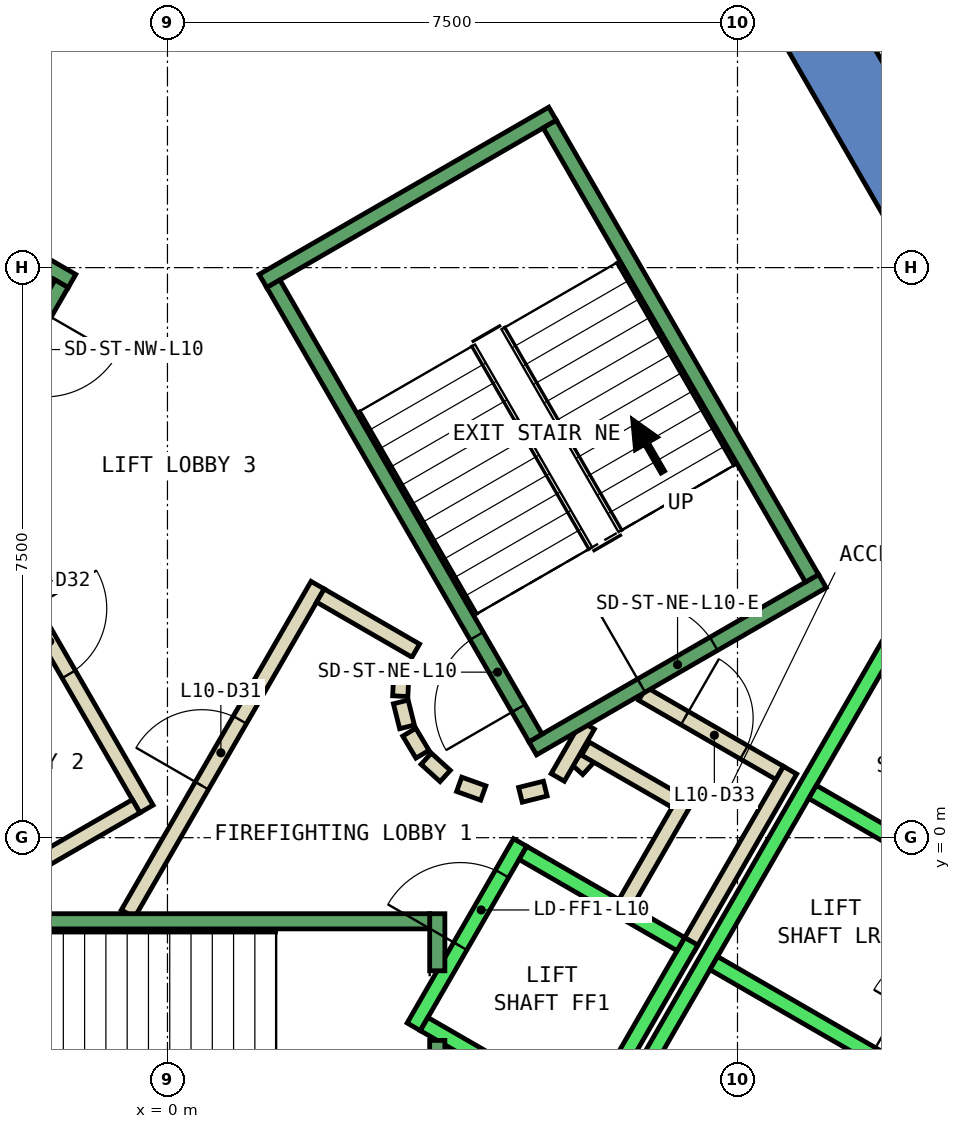
"""IFC4 building model, lengths in metres.
Left out: names, types, materials, properties, quantities, classifications, styles, units other than length and angle.
Written with IfcOpenShell. Run it as: python <this file> out.ifc"""

import sys

from ifc_helpers import new_model, si_unit, direction, frame, frame_2d, origin, place, context, subcontext, project, spatial, polyline, rectangle, outline, extrude, element, fill, save


model = new_model("IFC4")
c1 = context("Model", 3, precision=1e-05, world=origin(), true_north=direction((0.0, 1.0)))
c2 = subcontext(c1, "Body", "Model", "MODEL_VIEW")
j1 = project(units=[si_unit("LENGTHUNIT", "METRE"), si_unit("PLANEANGLEUNIT", "RADIAN")], contexts=[c1])
p1 = place(None, origin())
s1 = spatial("IfcSite", under=j1, at=p1, CompositionType="ELEMENT")
p2 = place(p1, origin())
s2 = spatial("IfcBuilding", under=s1, at=p2, CompositionType="ELEMENT")
p3 = place(p2, frame((0.0, 0.0, 51.8)))
s3 = spatial("IfcBuildingStorey", under=s2, at=p3, CompositionType="ELEMENT", Elevation=51.8)
p4 = place(p3, frame((0.0, 0.0, -0.4)))
e1 = element("IfcWall", 1, at=p4, inside=s3, PredefinedType="SHEAR", context=c2, shape_type="SweptSolid", body=[
    extrude(outline(polyline([(8.517, 11.748), (7.651, 11.248), (12.702, 2.5), (13.856, 2.5), (8.517, 11.748)])), origin(), (0.0, 0.0, 1.0), 4.2),
])
p5 = place(p3, frame((0.0, 0.0, -0.4)))
e2 = element("IfcWall", 2, at=p5, inside=s3, PredefinedType="SHEAR", context=c2, shape_type="SweptSolid", body=[
    extrude(outline(polyline([(10.717, -2.937), (9.851, -2.437), (9.201, -3.563), (10.067, -4.063), (10.717, -2.937)])), origin(), (0.0, 0.0, 1.0), 4.2),
])
p6 = place(p3, frame((5.39, 0.898, 0.0), z_axis=(0.0, 0.0, 1.0), x_axis=(0.673828488714, 0.738887791073, 0.0)))
e3 = element("IfcWall", 3, at=p6, inside=s3, PredefinedType="PARTITIONING", context=c2, shape_type="SweptSolid", body=[
    extrude(rectangle(XDim=0.263, YDim=0.2, at=frame_2d((0.131, 0.0))), origin(), (0.0, 0.0, 1.0), 3.8),
])
p7 = place(p3, frame((5.499, 1.172, 0.0), z_axis=(0.0, 0.0, 1.0), x_axis=(0.866333505267, -0.499465972466, 0.0)))
e4 = element("IfcWall", 4, at=p7, inside=s3, PredefinedType="PARTITIONING", context=c2, shape_type="SweptSolid", body=[
    extrude(rectangle(XDim=1.374, YDim=0.2, at=frame_2d((0.687, 0.0))), origin(), (0.0, 0.0, 1.0), 3.8),
])
p8 = place(p3, frame((6.826, 0.522, 0.0), z_axis=(0.0, 0.0, 1.0), x_axis=(-0.500016722714, -0.866015748706, 0.0)))
e5 = element("IfcWall", 5, at=p8, inside=s3, PredefinedType="PARTITIONING", context=c2, shape_type="SweptSolid", body=[
    extrude(rectangle(XDim=1.7, YDim=0.2, at=frame_2d((0.85, 0.0))), origin(), (0.0, 0.0, 1.0), 3.8),
])
p9 = place(p3, frame((6.25, 1.894, 0.0), z_axis=(0.0, 0.0, 1.0), x_axis=(0.866043184279, -0.499969202016, 0.0)))
e6 = element("IfcWall", 6, at=p9, inside=s3, PredefinedType="PARTITIONING", context=c2, shape_type="SweptSolid", body=[
    extrude(rectangle(XDim=2.084, YDim=0.2, at=frame_2d((1.042, 0.0))), origin(), (0.0, 0.0, 1.0), 3.8),
])
p10 = place(p9, frame((0.642, 0.0, 0.0)))
e7 = element("IfcOpeningElement", 7, at=p10, cuts=e6, PredefinedType="OPENING", context=c2, shape_type="SweptSolid", body=[
    extrude(rectangle(XDim=0.9, YDim=2.1, at=frame_2d((0.45, 1.05))), frame((0.0, 0.11, 0.0), z_axis=(0.0, -1.0, 0.0), x_axis=(1.0, 0.0, 0.0)), (0.0, 0.0, 1.0), 0.22),
])
p11 = place(p3, frame((8.192, 0.888, 0.0), z_axis=(0.0, 0.0, 1.0), x_axis=(-0.499940625693, -0.866059680843, 0.0)))
e8 = element("IfcWall", 8, at=p11, inside=s3, PredefinedType="PARTITIONING", context=c2, shape_type="SweptSolid", body=[
    extrude(rectangle(XDim=2.68, YDim=0.2, at=frame_2d((1.34, 0.0))), origin(), (0.0, 0.0, 1.0), 3.8),
])
p12 = place(p3, frame((5.135, 0.793, 0.0), z_axis=(0.0, 0.0, 1.0), x_axis=(0.499526442893, 0.866298639529, 0.0)))
e9 = element("IfcWall", 9, at=p12, inside=s3, PredefinedType="PARTITIONING", context=c2, shape_type="SweptSolid", body=[
    extrude(rectangle(XDim=0.791, YDim=0.2, at=frame_2d((0.396, 0.0))), origin(), (0.0, 0.0, 1.0), 3.8),
])
p13 = place(p3, frame((-0.52, -1.0, 0.0), z_axis=(0.0, 0.0, 1.0), x_axis=(0.50011622646, 0.865958290007, 0.0)))
e10 = element("IfcWall", 10, at=p13, inside=s3, PredefinedType="PARTITIONING", context=c2, shape_type="SweptSolid", body=[
    extrude(rectangle(XDim=4.991, YDim=0.2, at=frame_2d((2.496, 0.0))), origin(), (0.0, 0.0, 1.0), 3.8),
])
p14 = place(p13, frame((1.945, 0.0, 0.0)))
e11 = element("IfcOpeningElement", 11, at=p14, cuts=e10, PredefinedType="OPENING", context=c2, shape_type="SweptSolid", body=[
    extrude(rectangle(XDim=1.0, YDim=2.1, at=frame_2d((0.5, 1.05))), frame((0.0, 0.11, 0.0), z_axis=(0.0, -1.0, 0.0), x_axis=(1.0, 0.0, 0.0)), (0.0, 0.0, 1.0), 0.22),
])
p15 = place(p3, frame((2.012, 3.186, 0.0), z_axis=(0.0, 0.0, 1.0), x_axis=(0.865891012941, -0.500232699559, 0.0)))
e12 = element("IfcWall", 12, at=p15, inside=s3, PredefinedType="PARTITIONING", context=c2, shape_type="SweptSolid", body=[
    extrude(rectangle(XDim=1.449, YDim=0.2, at=frame_2d((0.725, 0.0))), origin(), (0.0, 0.0, 1.0), 3.8),
])
p16 = place(p3, frame((3.079, 2.199, 0.0), z_axis=(0.0, 0.0, 1.0), x_axis=(-0.047771483479, -0.998858290933, 0.0)))
e13 = element("IfcWall", 13, at=p16, inside=s3, PredefinedType="PARTITIONING", context=c2, shape_type="SweptSolid", body=[
    extrude(rectangle(XDim=0.337, YDim=0.2, at=frame_2d((0.169, 0.0))), origin(), (0.0, 0.0, 1.0), 3.8),
])
p17 = place(p3, frame((3.07, 1.786, 0.0), z_axis=(0.0, 0.0, 1.0), x_axis=(0.242705583207, -0.970099994784, 0.0)))
e14 = element("IfcWall", 14, at=p17, inside=s3, PredefinedType="PARTITIONING", context=c2, shape_type="SweptSolid", body=[
    extrude(rectangle(XDim=0.338, YDim=0.2, at=frame_2d((0.169, 0.0))), origin(), (0.0, 0.0, 1.0), 3.8),
])
for number, where, z_axis, x_axis in (
    (15, (3.182, 1.388, 0.0), (0.0, 0.0, 1.0), (0.512, -0.859, 0.0)),
    (16, (3.404, 1.039, 0.0), (0.0, 0.0, 1.0), (0.74, -0.672, 0.0)),
):
    element("IfcWall", number, at=place(p3, frame(where, z_axis=z_axis, x_axis=x_axis)), inside=s3, PredefinedType="PARTITIONING", context=c2, shape_type="SweptSolid", body=[
        extrude(rectangle(XDim=0.338, YDim=0.2, at=frame_2d((0.169, 0.0))), origin(), (0.0, 0.0, 1.0), 3.8),
    ])
p18 = place(p3, frame((3.838, 0.702, 0.0), z_axis=(0.0, 0.0, 1.0), x_axis=(0.941035081519, -0.338308993895, 0.0)))
e17 = element("IfcWall", 17, at=p18, inside=s3, PredefinedType="PARTITIONING", context=c2, shape_type="SweptSolid", body=[
    extrude(rectangle(XDim=0.337, YDim=0.2, at=frame_2d((0.168, 0.0))), origin(), (0.0, 0.0, 1.0), 3.8),
])
p19 = place(p3, frame((4.644, 0.564, 0.0), z_axis=(0.0, 0.0, 1.0), x_axis=(0.969929076366, 0.243387729394, 0.0)))
e18 = element("IfcWall", 18, at=p19, inside=s3, PredefinedType="PARTITIONING", context=c2, shape_type="SweptSolid", body=[
    extrude(rectangle(XDim=0.337, YDim=0.2, at=frame_2d((0.168, 0.0))), origin(), (0.0, 0.0, 1.0), 3.8),
])
p20 = place(p3, frame((-2.771, 4.7, 0.0), z_axis=(0.0, 0.0, 1.0), x_axis=(0.499969479948, -0.866043023828, 0.0)))
e19 = element("IfcWall", 19, at=p20, inside=s3, PredefinedType="PARTITIONING", context=c2, shape_type="SweptSolid", body=[
    extrude(rectangle(XDim=4.99, YDim=0.2, at=frame_2d((2.495, 0.0))), origin(), (0.0, 0.0, 1.0), 3.8),
])
p21 = place(p20, frame((1.945, 0.0, 0.0)))
e20 = element("IfcOpeningElement", 20, at=p21, cuts=e19, PredefinedType="OPENING", context=c2, shape_type="SweptSolid", body=[
    extrude(rectangle(XDim=1.0, YDim=2.1, at=frame_2d((0.5, 1.05))), frame((0.0, 0.11, 0.0), z_axis=(0.0, -1.0, 0.0), x_axis=(1.0, 0.0, 0.0)), (0.0, 0.0, 1.0), 0.22),
])
p22 = place(p3, frame((-0.412, 0.414, 0.0), z_axis=(0.0, 0.0, 1.0), x_axis=(-0.866017369001, -0.500013916395, 0.0)))
e21 = element("IfcWall", 21, at=p22, inside=s3, PredefinedType="PARTITIONING", context=c2, shape_type="SweptSolid", body=[
    extrude(rectangle(XDim=1.45, YDim=0.2, at=frame_2d((0.725, 0.0))), origin(), (0.0, 0.0, 1.0), 3.8),
])
p23 = place(p3, frame((3.24, -2.488, 0.0), z_axis=(0.0, 0.0, 1.0), x_axis=(0.49994636267, 0.866056369097, 0.0)))
e22 = element("IfcWall", 22, at=p23, inside=s3, PredefinedType="STANDARD", context=c2, shape_type="SweptSolid", body=[
    extrude(rectangle(XDim=2.8, YDim=0.2, at=frame_2d((1.4, 0.0))), origin(), (0.0, 0.0, 1.0), 3.8),
])
p24 = place(p23, frame((1.225, 0.0, 0.0)))
e23 = element("IfcOpeningElement", 23, at=p24, cuts=e22, PredefinedType="OPENING", context=c2, shape_type="SweptSolid", body=[
    extrude(rectangle(XDim=1.1, YDim=2.1, at=frame_2d((0.55, 1.05))), frame((0.0, 0.11, 0.0), z_axis=(0.0, -1.0, 0.0), x_axis=(1.0, 0.0, 0.0)), (0.0, 0.0, 1.0), 0.22),
])
p25 = place(p3, frame((5.492, -3.788, 0.0), z_axis=(0.0, 0.0, 1.0), x_axis=(0.500011755427, 0.866018616679, 0.0)))
e24 = element("IfcWall", 24, at=p25, inside=s3, PredefinedType="STANDARD", context=c2, shape_type="SweptSolid", body=[
    extrude(rectangle(XDim=2.8, YDim=0.2, at=frame_2d((1.4, 0.0))), origin(), (0.0, 0.0, 1.0), 3.8),
])
p26 = place(p3, frame((3.377, -2.452, 0.0), z_axis=(0.0, 0.0, 1.0), x_axis=(0.865955154139, -0.50012165622, 0.0)))
e25 = element("IfcWall", 25, at=p26, inside=s3, PredefinedType="STANDARD", context=c2, shape_type="SweptSolid", body=[
    extrude(rectangle(XDim=2.4, YDim=0.2, at=frame_2d((1.2, 0.0))), origin(), (0.0, 0.0, 1.0), 3.8),
])
p27 = place(p3, frame((4.677, -0.2, 0.0), z_axis=(0.0, 0.0, 1.0), x_axis=(0.865973769406, -0.500089422704, 0.0)))
e26 = element("IfcWall", 26, at=p27, inside=s3, PredefinedType="STANDARD", context=c2, shape_type="SweptSolid", body=[
    extrude(rectangle(XDim=2.399, YDim=0.2, at=frame_2d((1.2, 0.0))), origin(), (0.0, 0.0, 1.0), 3.8),
])
p28 = place(p3, frame((4.451, -6.19, 0.0), z_axis=(0.0, 0.0, 1.0), x_axis=(0.50000090737, 0.866024879913, 0.0)))
e27 = element("IfcWall", 27, at=p28, inside=s3, PredefinedType="STANDARD", context=c2, shape_type="SweptSolid", body=[
    extrude(rectangle(XDim=10.6, YDim=0.2, at=frame_2d((5.3, 0.0))), origin(), (0.0, 0.0, 1.0), 3.8),
])
for number, where, z_axis, x_axis in (
    (28, (7.188, -1.65, 0.0), (0.0, 0.0, 1.0), (0.866, -0.5, 0.0)),
    (29, (8.488, 0.602, 0.0), (0.0, 0.0, 1.0), (0.866, -0.5, 0.0)),
):
    element("IfcWall", number, at=place(p3, frame(where, z_axis=z_axis, x_axis=x_axis)), inside=s3, PredefinedType="STANDARD", context=c2, shape_type="SweptSolid", body=[
        extrude(rectangle(XDim=2.5, YDim=0.2, at=frame_2d((1.25, 0.0))), origin(), (0.0, 0.0, 1.0), 3.8),
    ])
p29 = place(p3, frame((3.55, -2.667, 0.0), z_axis=(0.0, 0.0, 1.0), x_axis=(0.0, -1.0, 0.0)))
e30 = element("IfcWall", 30, at=p29, inside=s3, PredefinedType="STANDARD", context=c2, shape_type="SweptSolid", body=[
    extrude(rectangle(XDim=2.733, YDim=0.2, at=frame_2d((1.366, 0.0))), origin(), (0.0, 0.0, 1.0), 3.8),
])
p30 = place(p3, frame((3.55, -1.0, 0.0), z_axis=(0.0, 0.0, 1.0), x_axis=(0.0, -1.0, 0.0)))
e31 = element("IfcWall", 31, at=p30, inside=s3, PredefinedType="STANDARD", context=c2, shape_type="SweptSolid", body=[
    extrude(rectangle(XDim=0.751, YDim=0.2, at=frame_2d((0.375, 0.0))), origin(), (0.0, 0.0, 1.0), 3.8),
])
p31 = place(p3, frame((-3.45, -1.1, 0.0), z_axis=(0.0, 0.0, 1.0), x_axis=(1.0, 0.0, 0.0)))
e32 = element("IfcWall", 32, at=p31, inside=s3, PredefinedType="STANDARD", context=c2, shape_type="SweptSolid", body=[
    extrude(rectangle(XDim=6.9, YDim=0.2, at=frame_2d((3.45, 0.0))), origin(), (0.0, 0.0, 1.0), 3.8),
])
p32 = place(p31, frame((0.45, 0.0, 0.0)))
e33 = element("IfcOpeningElement", 33, at=p32, cuts=e32, PredefinedType="OPENING", context=c2, shape_type="SweptSolid", body=[
    extrude(rectangle(XDim=1.1, YDim=2.2, at=frame_2d((0.55, 1.1))), frame((0.0, 0.11, 0.0), z_axis=(0.0, -1.0, 0.0), x_axis=(1.0, 0.0, 0.0)), (0.0, 0.0, 1.0), 0.22),
])
p33 = place(p3, frame((4.806, 1.176, 0.0), z_axis=(0.0, 0.0, 1.0), x_axis=(0.866059941101, 0.499940174841, 0.0)))
e34 = element("IfcWall", 34, at=p33, inside=s3, PredefinedType="STANDARD", context=c2, shape_type="SweptSolid", body=[
    extrude(rectangle(XDim=4.4, YDim=0.2, at=frame_2d((2.2, 0.0))), origin(), (0.0, 0.0, 1.0), 3.8),
])
p34 = place(p33, frame((1.65, 0.0, 0.0)))
e35 = element("IfcOpeningElement", 35, at=p34, cuts=e34, PredefinedType="OPENING", context=c2, shape_type="SweptSolid", body=[
    extrude(rectangle(XDim=1.1, YDim=2.2, at=frame_2d((0.55, 1.1))), frame((0.0, 0.11, 0.0), z_axis=(0.0, -1.0, 0.0), x_axis=(1.0, 0.0, 0.0)), (0.0, 0.0, 1.0), 0.22),
])
p35 = place(p3, frame((1.256, 7.324, 0.0), z_axis=(0.0, 0.0, 1.0), x_axis=(0.866046073146, 0.499964197906, 0.0)))
e36 = element("IfcWall", 36, at=p35, inside=s3, PredefinedType="STANDARD", context=c2, shape_type="SweptSolid", body=[
    extrude(rectangle(XDim=4.4, YDim=0.2, at=frame_2d((2.2, 0.0))), origin(), (0.0, 0.0, 1.0), 3.8),
])
p36 = place(p3, frame((4.843, 1.312, 0.0), z_axis=(0.0, 0.0, 1.0), x_axis=(-0.499963383562, 0.866046543262, 0.0)))
e37 = element("IfcWall", 37, at=p36, inside=s3, PredefinedType="STANDARD", context=c2, shape_type="SweptSolid", body=[
    extrude(rectangle(XDim=6.9, YDim=0.2, at=frame_2d((3.45, 0.0))), origin(), (0.0, 0.0, 1.0), 3.8),
])
p37 = place(p36, frame((0.45, 0.0, 0.0)))
e38 = element("IfcOpeningElement", 38, at=p37, cuts=e37, PredefinedType="OPENING", context=c2, shape_type="SweptSolid", body=[
    extrude(rectangle(XDim=1.1, YDim=2.2, at=frame_2d((0.55, 1.1))), frame((0.0, 0.11, 0.0), z_axis=(0.0, -1.0, 0.0), x_axis=(1.0, 0.0, 0.0)), (0.0, 0.0, 1.0), 0.22),
])
p38 = place(p3, frame((8.48, 3.412, 0.0), z_axis=(0.0, 0.0, 1.0), x_axis=(-0.499978703459, 0.866037698999, 0.0)))
e39 = element("IfcWall", 39, at=p38, inside=s3, PredefinedType="STANDARD", context=c2, shape_type="SweptSolid", body=[
    extrude(rectangle(XDim=6.9, YDim=0.2, at=frame_2d((3.45, 0.0))), origin(), (0.0, 0.0, 1.0), 3.8),
])
p39 = place(p3, frame((-1.256, 7.324, 0.0), z_axis=(0.0, 0.0, 1.0), x_axis=(-0.866046073146, 0.499964197906, 0.0)))
e40 = element("IfcWall", 40, at=p39, inside=s3, PredefinedType="STANDARD", context=c2, shape_type="SweptSolid", body=[
    extrude(rectangle(XDim=4.4, YDim=0.2, at=frame_2d((2.2, 0.0))), origin(), (0.0, 0.0, 1.0), 3.8),
])
p40 = place(p39, frame((1.65, 0.0, 0.0)))
e41 = element("IfcOpeningElement", 41, at=p40, cuts=e40, PredefinedType="OPENING", context=c2, shape_type="SweptSolid", body=[
    extrude(rectangle(XDim=1.1, YDim=2.2, at=frame_2d((0.55, 1.1))), frame((0.0, 0.11, 0.0), z_axis=(0.0, -1.0, 0.0), x_axis=(1.0, 0.0, 0.0)), (0.0, 0.0, 1.0), 0.22),
])
p41 = place(p3, frame((-1.393, 7.288, 0.0), z_axis=(0.0, 0.0, 1.0), x_axis=(-0.499963383562, -0.866046543262, 0.0)))
e42 = element("IfcWall", 42, at=p41, inside=s3, PredefinedType="STANDARD", context=c2, shape_type="SweptSolid", body=[
    extrude(rectangle(XDim=6.9, YDim=0.2, at=frame_2d((3.45, 0.0))), origin(), (0.0, 0.0, 1.0), 3.8),
])
p42 = place(p41, frame((0.45, 0.0, 0.0)))
e43 = element("IfcOpeningElement", 43, at=p42, cuts=e42, PredefinedType="OPENING", context=c2, shape_type="SweptSolid", body=[
    extrude(rectangle(XDim=1.1, YDim=2.2, at=frame_2d((0.55, 1.1))), frame((0.0, 0.11, 0.0), z_axis=(0.0, -1.0, 0.0), x_axis=(1.0, 0.0, 0.0)), (0.0, 0.0, 1.0), 0.22),
])
p43 = place(p14, origin())
e44 = element("IfcDoor", 44, at=p43, inside=s3, OperationType="SINGLE_SWING_LEFT", PredefinedType="DOOR", context=c2, shape_type="SweptSolid", body=[
    extrude(rectangle(XDim=1.0, YDim=2.1, at=frame_2d((0.5, 1.05))), frame((0.0, 0.025, 0.0), z_axis=(0.0, -1.0, 0.0), x_axis=(1.0, 0.0, 0.0)), (0.0, 0.0, 1.0), 0.05),
])
fill(e11, e44)
p44 = place(p21, origin())
e45 = element("IfcDoor", 45, at=p44, inside=s3, OperationType="SINGLE_SWING_RIGHT", PredefinedType="DOOR", context=c2, shape_type="SweptSolid", body=[
    extrude(rectangle(XDim=1.0, YDim=2.1, at=frame_2d((0.5, 1.05))), frame((0.0, 0.025, 0.0), z_axis=(0.0, -1.0, 0.0), x_axis=(1.0, 0.0, 0.0)), (0.0, 0.0, 1.0), 0.05),
])
fill(e20, e45)
p45 = place(p10, origin())
e46 = element("IfcDoor", 46, at=p45, inside=s3, OperationType="SINGLE_SWING_LEFT", PredefinedType="DOOR", context=c2, shape_type="SweptSolid", body=[
    extrude(rectangle(XDim=0.9, YDim=2.1, at=frame_2d((0.45, 1.05))), frame((0.0, 0.025, 0.0), z_axis=(0.0, -1.0, 0.0), x_axis=(1.0, 0.0, 0.0)), (0.0, 0.0, 1.0), 0.05),
])
fill(e7, e46)
p46 = place(p24, origin())
e47 = element("IfcDoor", 47, at=p46, inside=s3, OperationType="SLIDING_TO_LEFT", PredefinedType="DOOR", context=c2, shape_type="SweptSolid", body=[
    extrude(rectangle(XDim=1.1, YDim=2.1, at=frame_2d((0.55, 1.05))), frame((0.0, 0.025, 0.0), z_axis=(0.0, -1.0, 0.0), x_axis=(1.0, 0.0, 0.0)), (0.0, 0.0, 1.0), 0.05),
])
fill(e23, e47)
p47 = place(p37, origin())
e48 = element("IfcDoor", 48, at=p47, inside=s3, OperationType="SINGLE_SWING_LEFT", PredefinedType="DOOR", context=c2, shape_type="SweptSolid", body=[
    extrude(rectangle(XDim=1.1, YDim=2.2, at=frame_2d((0.55, 1.1))), frame((0.0, 0.025, 0.0), z_axis=(0.0, -1.0, 0.0), x_axis=(1.0, 0.0, 0.0)), (0.0, 0.0, 1.0), 0.05),
])
fill(e38, e48)
p48 = place(p34, origin())
e49 = element("IfcDoor", 49, at=p48, inside=s3, OperationType="SINGLE_SWING_LEFT", PredefinedType="DOOR", context=c2, shape_type="SweptSolid", body=[
    extrude(rectangle(XDim=1.1, YDim=2.2, at=frame_2d((0.55, 1.1))), frame((0.0, 0.025, 0.0), z_axis=(0.0, -1.0, 0.0), x_axis=(1.0, 0.0, 0.0)), (0.0, 0.0, 1.0), 0.05),
])
fill(e35, e49)
save(model, sys.argv[1])
